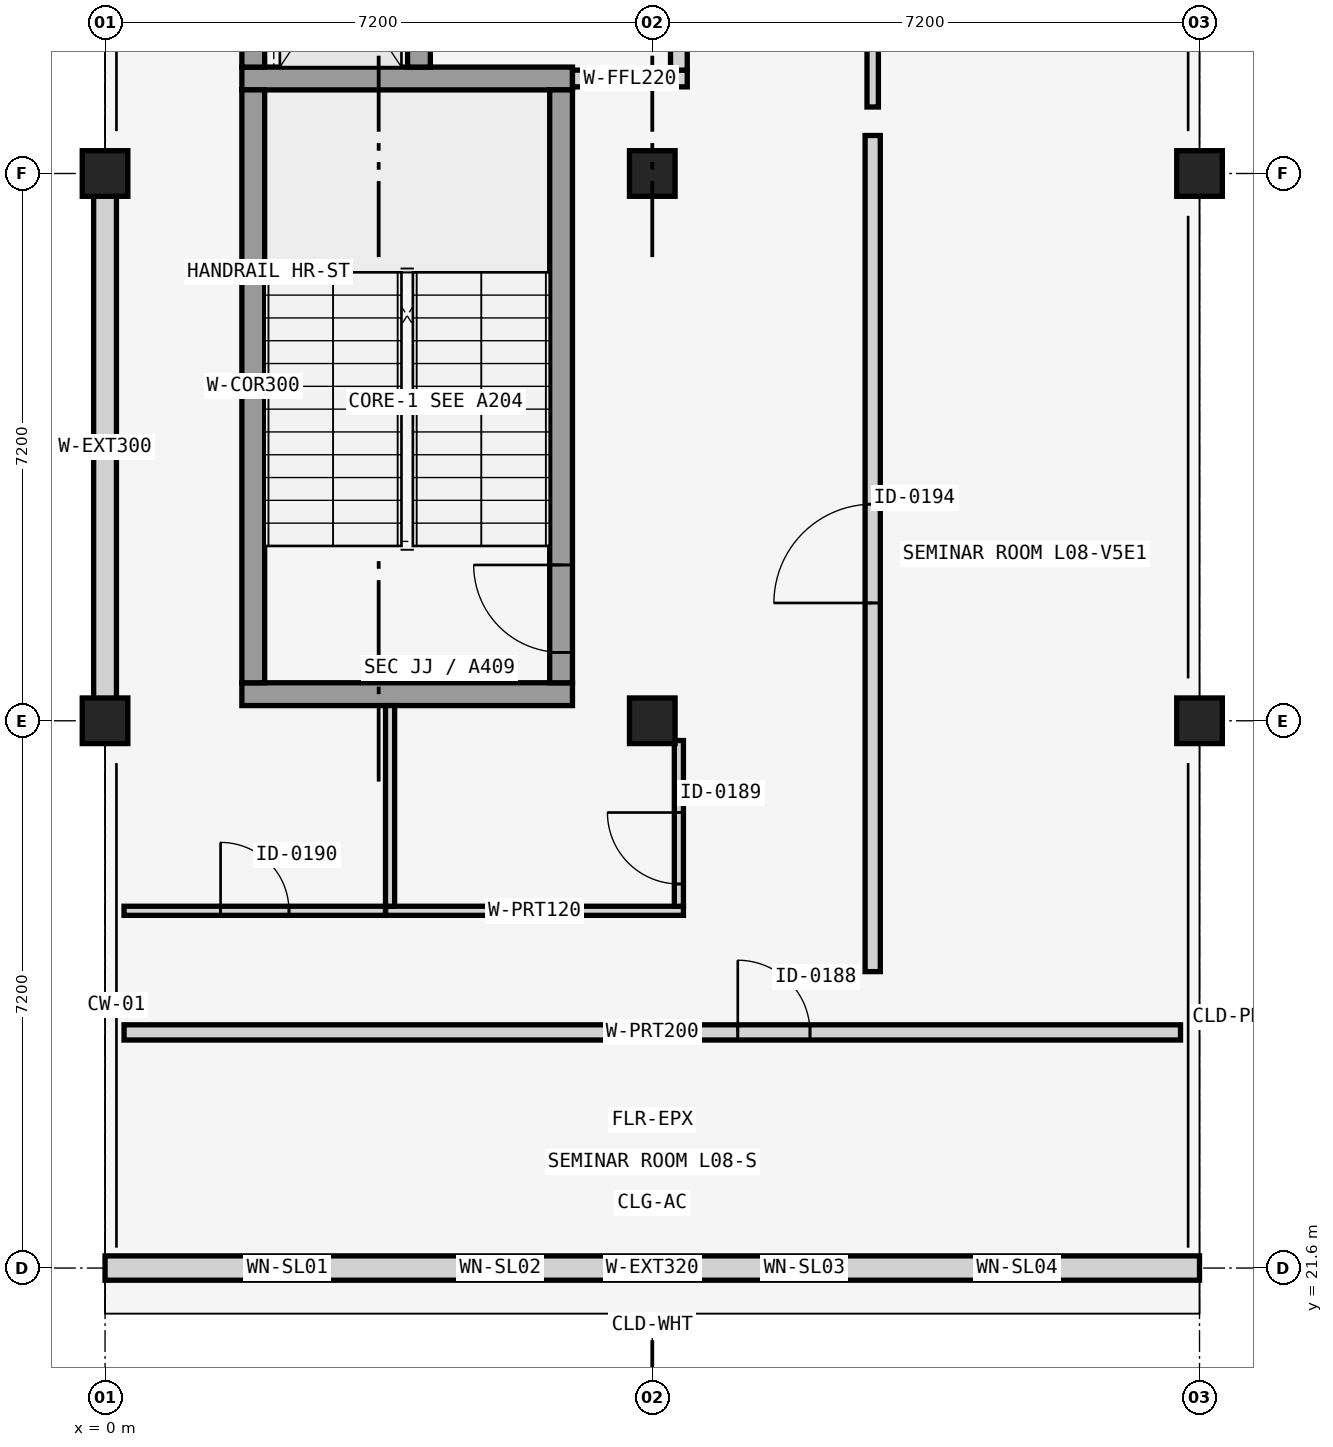
"""IFC4 building model, lengths in metres.
Left out: names, types, materials, properties, quantities, classifications, styles, units other than length and angle.
Written with IfcOpenShell. Run it as: python <this file> out.ifc"""

import sys

from ifc_helpers import new_model, si_unit, direction, frame, frame_2d, origin, origin_2d, place, context, subcontext, project, spatial, rectangle, extrude, element, fill, save


model = new_model("IFC4")
c1 = context("Model", 3, precision=1e-05, world=origin(), true_north=direction((0.0, 1.0)))
c2 = subcontext(c1, "Body", "Model", "MODEL_VIEW")
j1 = project(units=[si_unit("LENGTHUNIT", "METRE"), si_unit("PLANEANGLEUNIT", "RADIAN")], contexts=[c1])
p1 = place(None, origin())
s1 = spatial("IfcSite", under=j1, at=p1, CompositionType="ELEMENT")
p2 = place(p1, origin())
s2 = spatial("IfcBuilding", under=s1, at=p2, CompositionType="ELEMENT")
p3 = place(p2, frame((0.0, 0.0, 33.92)))
s3 = spatial("IfcBuildingStorey", under=s2, at=p3, CompositionType="ELEMENT", Elevation=33.92)
for number, where, z_axis, x_axis in (
    (1, (0.0, 28.8, 0.0), (0.0, 0.0, 1.0), (1.0, 0.0, 0.0)),
    (2, (0.0, 36.0, 0.0), (0.0, 0.0, 1.0), (1.0, 0.0, 0.0)),
    (3, (7.2, 28.8, 0.0), (0.0, 0.0, 1.0), (1.0, 0.0, 0.0)),
    (4, (7.2, 36.0, 0.0), (0.0, 0.0, 1.0), (1.0, 0.0, 0.0)),
    (5, (14.4, 28.8, 0.0), (0.0, 0.0, 1.0), (1.0, 0.0, 0.0)),
    (6, (14.4, 36.0, 0.0), (0.0, 0.0, 1.0), (1.0, 0.0, 0.0)),
):
    element("IfcColumn", number, at=place(p3, frame(where, z_axis=z_axis, x_axis=x_axis)), inside=s3, PredefinedType="COLUMN", context=c2, shape_type="SweptSolid", body=[
        extrude(rectangle(XDim=0.6, YDim=0.6, at=origin_2d()), origin(), (0.0, 0.0, 1.0), 4.16),
    ])
p4 = place(p3, frame((0.0, 21.6, 0.0), z_axis=(0.0, 0.0, 1.0), x_axis=(1.0, 0.0, 0.0)))
e7 = element("IfcWall", 7, at=p4, inside=s3, PredefinedType="SOLIDWALL", context=c2, shape_type="SweptSolid", body=[
    extrude(rectangle(XDim=14.4, YDim=0.32, at=frame_2d((7.2, 0.0))), origin(), (0.0, 0.0, 1.0), 3.01),
])
p5 = place(p4, frame((2.175, 0.0, 0.45)))
e8 = element("IfcOpeningElement", 8, at=p5, cuts=e7, PredefinedType="OPENING", context=c2, shape_type="SweptSolid", body=[
    extrude(rectangle(XDim=0.45, YDim=2.4, at=frame_2d((0.225, 1.2))), frame((0.0, 0.17, 0.0), z_axis=(0.0, -1.0, 0.0), x_axis=(1.0, 0.0, 0.0)), (0.0, 0.0, 1.0), 0.34),
])
p6 = place(p4, frame((4.95, 0.0, 0.45)))
e9 = element("IfcOpeningElement", 9, at=p6, cuts=e7, PredefinedType="OPENING", context=c2, shape_type="SweptSolid", body=[
    extrude(rectangle(XDim=0.5, YDim=2.4, at=frame_2d((0.25, 1.2))), frame((0.0, 0.17, 0.0), z_axis=(0.0, -1.0, 0.0), x_axis=(1.0, 0.0, 0.0)), (0.0, 0.0, 1.0), 0.34),
])
p7 = place(p4, frame((8.925, 0.0, 0.65)))
e10 = element("IfcOpeningElement", 10, at=p7, cuts=e7, PredefinedType="OPENING", context=c2, shape_type="SweptSolid", body=[
    extrude(rectangle(XDim=0.55, YDim=2.2, at=frame_2d((0.275, 1.1))), frame((0.0, 0.17, 0.0), z_axis=(0.0, -1.0, 0.0), x_axis=(1.0, 0.0, 0.0)), (0.0, 0.0, 1.0), 0.34),
])
p8 = place(p4, frame((11.775, 0.0, 0.75)))
e11 = element("IfcOpeningElement", 11, at=p8, cuts=e7, PredefinedType="OPENING", context=c2, shape_type="SweptSolid", body=[
    extrude(rectangle(XDim=0.45, YDim=2.1, at=frame_2d((0.225, 1.05))), frame((0.0, 0.17, 0.0), z_axis=(0.0, -1.0, 0.0), x_axis=(1.0, 0.0, 0.0)), (0.0, 0.0, 1.0), 0.34),
])
p9 = place(p3, frame((0.0, 29.09, 0.0), z_axis=(0.0, 0.0, 1.0), x_axis=(0.0, 1.0, 0.0)))
e12 = element("IfcWall", 12, at=p9, inside=s3, PredefinedType="SOLIDWALL", context=c2, shape_type="SweptSolid", body=[
    extrude(rectangle(XDim=6.62, YDim=0.3, at=frame_2d((3.31, 0.0))), origin(), (0.0, 0.0, 1.0), 3.01),
])
for number, where, z_axis, x_axis in (
    (13, (1.8, 29.15, 0.0), (0.0, 0.0, 1.0), (1.0, 0.0, 0.0)),
    (14, (1.8, 37.25, 0.0), (0.0, 0.0, 1.0), (1.0, 0.0, 0.0)),
):
    element("IfcWall", number, at=place(p3, frame(where, z_axis=z_axis, x_axis=x_axis)), inside=s3, PredefinedType="SHEAR", context=c2, shape_type="SweptSolid", body=[
        extrude(rectangle(XDim=4.35, YDim=0.3, at=frame_2d((2.175, 0.0))), origin(), (0.0, 0.0, 1.0), 3.81),
    ])
p10 = place(p3, frame((1.95, 29.3, 0.0), z_axis=(0.0, 0.0, 1.0), x_axis=(0.0, 1.0, 0.0)))
e15 = element("IfcWall", 15, at=p10, inside=s3, PredefinedType="SHEAR", context=c2, shape_type="SweptSolid", body=[
    extrude(rectangle(XDim=7.8, YDim=0.3, at=frame_2d((3.9, 0.0))), origin(), (0.0, 0.0, 1.0), 3.81),
])
p11 = place(p3, frame((6.0, 29.3, 0.0), z_axis=(0.0, 0.0, 1.0), x_axis=(0.0, 1.0, 0.0)))
e16 = element("IfcWall", 16, at=p11, inside=s3, PredefinedType="SHEAR", context=c2, shape_type="SweptSolid", body=[
    extrude(rectangle(XDim=7.8, YDim=0.3, at=frame_2d((3.9, 0.0))), origin(), (0.0, 0.0, 1.0), 3.81),
])
p12 = place(p11, frame((0.4, 0.0, 0.0)))
e17 = element("IfcOpeningElement", 17, at=p12, cuts=e16, PredefinedType="OPENING", context=c2, shape_type="SweptSolid", body=[
    extrude(rectangle(XDim=1.15, YDim=2.2, at=frame_2d((0.575, 1.1))), frame((0.0, 0.16, 0.0), z_axis=(0.0, -1.0, 0.0), x_axis=(1.0, 0.0, 0.0)), (0.0, 0.0, 1.0), 0.32),
])
p13 = place(p3, frame((1.95, 37.4, 0.0), z_axis=(0.0, 0.0, 1.0), x_axis=(0.0, 1.0, 0.0)))
e18 = element("IfcWall", 18, at=p13, inside=s3, PredefinedType="SHEAR", context=c2, shape_type="SweptSolid", body=[
    extrude(rectangle(XDim=4.93, YDim=0.3, at=frame_2d((2.465, 0.0))), origin(), (0.0, 0.0, 1.0), 3.81),
])
p14 = place(p3, frame((4.13, 37.4, 0.0), z_axis=(0.0, 0.0, 1.0), x_axis=(0.0, 1.0, 0.0)))
e19 = element("IfcWall", 19, at=p14, inside=s3, PredefinedType="SHEAR", context=c2, shape_type="SweptSolid", body=[
    extrude(rectangle(XDim=4.93, YDim=0.3, at=frame_2d((2.465, 0.0))), origin(), (0.0, 0.0, 1.0), 3.81),
])
p15 = place(p14, frame((0.65, 0.0, 0.0)))
e20 = element("IfcOpeningElement", 20, at=p15, cuts=e19, PredefinedType="OPENING", context=c2, shape_type="SweptSolid", body=[
    extrude(rectangle(XDim=1.1, YDim=2.2, at=frame_2d((0.55, 1.1))), frame((0.0, 0.16, 0.0), z_axis=(0.0, -1.0, 0.0), x_axis=(1.0, 0.0, 0.0)), (0.0, 0.0, 1.0), 0.32),
])
p16 = place(p14, frame((3.25, 0.0, 0.0)))
e21 = element("IfcOpeningElement", 21, at=p16, cuts=e19, PredefinedType="OPENING", context=c2, shape_type="SweptSolid", body=[
    extrude(rectangle(XDim=1.1, YDim=2.2, at=frame_2d((0.55, 1.1))), frame((0.0, 0.16, 0.0), z_axis=(0.0, -1.0, 0.0), x_axis=(1.0, 0.0, 0.0)), (0.0, 0.0, 1.0), 0.32),
])
p17 = place(p3, frame((6.15, 37.25, 0.0), z_axis=(0.0, 0.0, 1.0), x_axis=(1.0, 0.0, 0.0)))
e22 = element("IfcWall", 22, at=p17, inside=s3, PredefinedType="SOLIDWALL", context=c2, shape_type="SweptSolid", body=[
    extrude(rectangle(XDim=1.51, YDim=0.22, at=frame_2d((0.755, 0.0))), origin(), (0.0, 0.0, 1.0), 3.01),
])
p18 = place(p3, frame((7.55, 37.36, 0.0), z_axis=(0.0, 0.0, 1.0), x_axis=(0.0, 1.0, 0.0)))
e23 = element("IfcWall", 23, at=p18, inside=s3, PredefinedType="SOLIDWALL", context=c2, shape_type="SweptSolid", body=[
    extrude(rectangle(XDim=5.08, YDim=0.22, at=frame_2d((2.54, 0.0))), origin(), (0.0, 0.0, 1.0), 3.51),
])
p19 = place(p18, frame((1.94, 0.0, 0.0)))
e24 = element("IfcOpeningElement", 24, at=p19, cuts=e23, PredefinedType="OPENING", context=c2, shape_type="SweptSolid", body=[
    extrude(rectangle(XDim=1.2, YDim=2.2, at=frame_2d((0.6, 1.1))), frame((0.0, 0.12, 0.0), z_axis=(0.0, -1.0, 0.0), x_axis=(1.0, 0.0, 0.0)), (0.0, 0.0, 1.0), 0.24),
])
p20 = place(p3, frame((0.25, 24.7, 0.0), z_axis=(0.0, 0.0, 1.0), x_axis=(1.0, 0.0, 0.0)))
e25 = element("IfcWall", 25, at=p20, inside=s3, PredefinedType="PARTITIONING", context=c2, shape_type="SweptSolid", body=[
    extrude(rectangle(XDim=13.9, YDim=0.2, at=frame_2d((6.95, 0.0))), origin(), (0.0, 0.0, 1.0), 3.01),
])
p21 = place(p20, frame((8.075, 0.0, 0.0)))
e26 = element("IfcOpeningElement", 26, at=p21, cuts=e25, PredefinedType="OPENING", context=c2, shape_type="SweptSolid", body=[
    extrude(rectangle(XDim=0.95, YDim=2.1, at=frame_2d((0.475, 1.05))), frame((0.0, 0.11, 0.0), z_axis=(0.0, -1.0, 0.0), x_axis=(1.0, 0.0, 0.0)), (0.0, 0.0, 1.0), 0.22),
])
p22 = place(p3, frame((3.69, 26.3, 0.0), z_axis=(0.0, 0.0, 1.0), x_axis=(1.0, 0.0, 0.0)))
e27 = element("IfcWall", 27, at=p22, inside=s3, PredefinedType="PARTITIONING", context=c2, shape_type="SweptSolid", body=[
    extrude(rectangle(XDim=3.92, YDim=0.12, at=frame_2d((1.96, 0.0))), origin(), (0.0, 0.0, 1.0), 3.01),
])
p23 = place(p3, frame((3.75, 26.36, 0.0), z_axis=(0.0, 0.0, 1.0), x_axis=(0.0, 1.0, 0.0)))
e28 = element("IfcWall", 28, at=p23, inside=s3, PredefinedType="PARTITIONING", context=c2, shape_type="SweptSolid", body=[
    extrude(rectangle(XDim=2.64, YDim=0.12, at=frame_2d((1.32, 0.0))), origin(), (0.0, 0.0, 1.0), 3.21),
])
p24 = place(p3, frame((7.55, 26.36, 0.0), z_axis=(0.0, 0.0, 1.0), x_axis=(0.0, 1.0, 0.0)))
e29 = element("IfcWall", 29, at=p24, inside=s3, PredefinedType="PARTITIONING", context=c2, shape_type="SweptSolid", body=[
    extrude(rectangle(XDim=2.18, YDim=0.12, at=frame_2d((1.09, 0.0))), origin(), (0.0, 0.0, 1.0), 3.81),
])
p25 = place(p24, frame((0.293, 0.0, 0.0)))
e30 = element("IfcOpeningElement", 30, at=p25, cuts=e29, PredefinedType="OPENING", context=c2, shape_type="SweptSolid", body=[
    extrude(rectangle(XDim=0.94, YDim=2.1, at=frame_2d((0.47, 1.05))), frame((0.0, 0.07, 0.0), z_axis=(0.0, -1.0, 0.0), x_axis=(1.0, 0.0, 0.0)), (0.0, 0.0, 1.0), 0.14),
])
p26 = place(p3, frame((0.25, 26.3, 0.0), z_axis=(0.0, 0.0, 1.0), x_axis=(1.0, 0.0, 0.0)))
e31 = element("IfcWall", 31, at=p26, inside=s3, PredefinedType="PARTITIONING", context=c2, shape_type="SweptSolid", body=[
    extrude(rectangle(XDim=3.44, YDim=0.12, at=frame_2d((1.72, 0.0))), origin(), (0.0, 0.0, 1.0), 3.81),
])
p27 = place(p26, frame((1.27, 0.0, 0.0)))
e32 = element("IfcOpeningElement", 32, at=p27, cuts=e31, PredefinedType="OPENING", context=c2, shape_type="SweptSolid", body=[
    extrude(rectangle(XDim=0.9, YDim=2.1, at=frame_2d((0.45, 1.05))), frame((0.0, 0.07, 0.0), z_axis=(0.0, -1.0, 0.0), x_axis=(1.0, 0.0, 0.0)), (0.0, 0.0, 1.0), 0.14),
])
p28 = place(p3, frame((10.1, 25.5, 0.0), z_axis=(0.0, 0.0, 1.0), x_axis=(0.0, 1.0, 0.0)))
e33 = element("IfcWall", 33, at=p28, inside=s3, PredefinedType="PARTITIONING", context=c2, shape_type="SweptSolid", body=[
    extrude(rectangle(XDim=11.0, YDim=0.2, at=frame_2d((5.5, 0.0))), origin(), (0.0, 0.0, 1.0), 3.21),
])
p29 = place(p28, frame((4.85, 0.0, 0.0)))
e34 = element("IfcOpeningElement", 34, at=p29, cuts=e33, PredefinedType="OPENING", context=c2, shape_type="SweptSolid", body=[
    extrude(rectangle(XDim=1.3, YDim=2.15, at=frame_2d((0.65, 1.075))), frame((0.0, 0.11, 0.0), z_axis=(0.0, -1.0, 0.0), x_axis=(1.0, 0.0, 0.0)), (0.0, 0.0, 1.0), 0.22),
])
p30 = place(p3, frame((10.1, 36.875, 0.0), z_axis=(0.0, 0.0, 1.0), x_axis=(0.0, 1.0, 0.0)))
e35 = element("IfcWall", 35, at=p30, inside=s3, PredefinedType="PARTITIONING", context=c2, shape_type="SweptSolid", body=[
    extrude(rectangle(XDim=15.85, YDim=0.15, at=frame_2d((7.925, 0.0))), origin(), (0.0, 0.0, 1.0), 3.21),
])
p31 = place(p30, frame((7.2, 0.0, 0.0)))
e36 = element("IfcOpeningElement", 36, at=p31, cuts=e35, PredefinedType="OPENING", context=c2, shape_type="SweptSolid", body=[
    extrude(rectangle(XDim=1.45, YDim=2.2, at=frame_2d((0.725, 1.1))), frame((0.0, 0.085, 0.0), z_axis=(0.0, -1.0, 0.0), x_axis=(1.0, 0.0, 0.0)), (0.0, 0.0, 1.0), 0.17),
])
p32 = place(p5, origin())
e37 = element("IfcWindow", 37, at=p32, inside=s3, PartitioningType="SINGLE_PANEL", PredefinedType="WINDOW", context=c2, shape_type="SweptSolid", body=[
    extrude(rectangle(XDim=0.45, YDim=2.4, at=frame_2d((0.225, 1.2))), frame((0.0, 0.03, 0.0), z_axis=(0.0, -1.0, 0.0), x_axis=(1.0, 0.0, 0.0)), (0.0, 0.0, 1.0), 0.06),
])
fill(e8, e37)
p33 = place(p6, origin())
e38 = element("IfcWindow", 38, at=p33, inside=s3, PartitioningType="SINGLE_PANEL", PredefinedType="WINDOW", context=c2, shape_type="SweptSolid", body=[
    extrude(rectangle(XDim=0.5, YDim=2.4, at=frame_2d((0.25, 1.2))), frame((0.0, 0.03, 0.0), z_axis=(0.0, -1.0, 0.0), x_axis=(1.0, 0.0, 0.0)), (0.0, 0.0, 1.0), 0.06),
])
fill(e9, e38)
p34 = place(p7, origin())
e39 = element("IfcWindow", 39, at=p34, inside=s3, PartitioningType="SINGLE_PANEL", PredefinedType="WINDOW", context=c2, shape_type="SweptSolid", body=[
    extrude(rectangle(XDim=0.55, YDim=2.2, at=frame_2d((0.275, 1.1))), frame((0.0, 0.03, 0.0), z_axis=(0.0, -1.0, 0.0), x_axis=(1.0, 0.0, 0.0)), (0.0, 0.0, 1.0), 0.06),
])
fill(e10, e39)
p35 = place(p8, origin())
e40 = element("IfcWindow", 40, at=p35, inside=s3, PartitioningType="SINGLE_PANEL", PredefinedType="WINDOW", context=c2, shape_type="SweptSolid", body=[
    extrude(rectangle(XDim=0.45, YDim=2.1, at=frame_2d((0.225, 1.05))), frame((0.0, 0.03, 0.0), z_axis=(0.0, -1.0, 0.0), x_axis=(1.0, 0.0, 0.0)), (0.0, 0.0, 1.0), 0.06),
])
fill(e11, e40)
p36 = place(p12, origin())
e41 = element("IfcDoor", 41, at=p36, inside=s3, OperationType="SINGLE_SWING_RIGHT", PredefinedType="DOOR", context=c2, shape_type="SweptSolid", body=[
    extrude(rectangle(XDim=1.15, YDim=2.2, at=frame_2d((0.575, 1.1))), frame((0.0, 0.025, 0.0), z_axis=(0.0, -1.0, 0.0), x_axis=(1.0, 0.0, 0.0)), (0.0, 0.0, 1.0), 0.05),
])
fill(e17, e41)
p37 = place(p21, origin())
e42 = element("IfcDoor", 42, at=p37, inside=s3, OperationType="SINGLE_SWING_LEFT", PredefinedType="DOOR", context=c2, shape_type="SweptSolid", body=[
    extrude(rectangle(XDim=0.95, YDim=2.1, at=frame_2d((0.475, 1.05))), frame((0.0, 0.025, 0.0), z_axis=(0.0, -1.0, 0.0), x_axis=(1.0, 0.0, 0.0)), (0.0, 0.0, 1.0), 0.05),
])
fill(e26, e42)
p38 = place(p25, frame((0.94, 0.0, 0.0), z_axis=(0.0, 0.0, 1.0), x_axis=(-1.0, 0.0, 0.0)))
e43 = element("IfcDoor", 43, at=p38, inside=s3, OperationType="SINGLE_SWING_RIGHT", PredefinedType="DOOR", context=c2, shape_type="SweptSolid", body=[
    extrude(rectangle(XDim=0.94, YDim=2.1, at=frame_2d((0.47, 1.05))), frame((0.0, 0.025, 0.0), z_axis=(0.0, -1.0, 0.0), x_axis=(1.0, 0.0, 0.0)), (0.0, 0.0, 1.0), 0.05),
])
fill(e30, e43)
p39 = place(p27, origin())
e44 = element("IfcDoor", 44, at=p39, inside=s3, OperationType="SINGLE_SWING_LEFT", PredefinedType="DOOR", context=c2, shape_type="SweptSolid", body=[
    extrude(rectangle(XDim=0.9, YDim=2.1, at=frame_2d((0.45, 1.05))), frame((0.0, 0.025, 0.0), z_axis=(0.0, -1.0, 0.0), x_axis=(1.0, 0.0, 0.0)), (0.0, 0.0, 1.0), 0.05),
])
fill(e32, e44)
p40 = place(p29, origin())
e45 = element("IfcDoor", 45, at=p40, inside=s3, OperationType="SINGLE_SWING_LEFT", PredefinedType="DOOR", context=c2, shape_type="SweptSolid", body=[
    extrude(rectangle(XDim=1.3, YDim=2.15, at=frame_2d((0.65, 1.075))), frame((0.0, 0.025, 0.0), z_axis=(0.0, -1.0, 0.0), x_axis=(1.0, 0.0, 0.0)), (0.0, 0.0, 1.0), 0.05),
])
fill(e34, e45)
save(model, sys.argv[1])
